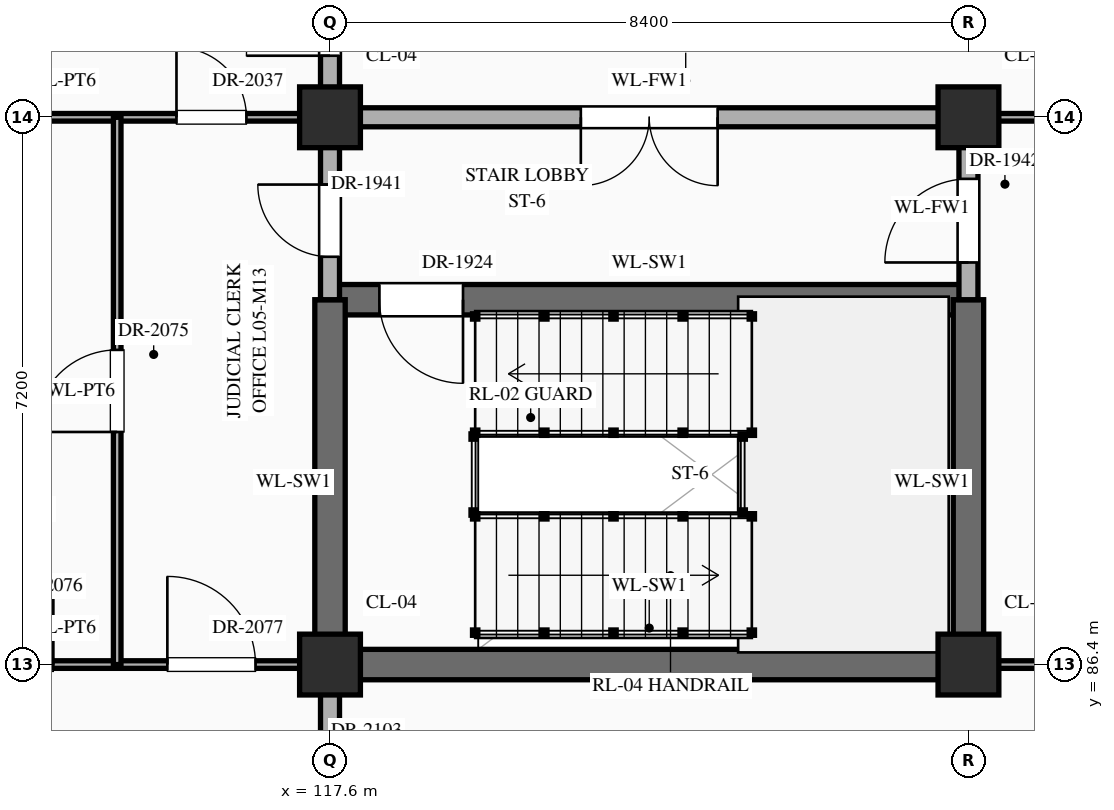
"""IFC4 building model, lengths in metres.
Left out: names, types, materials, properties, quantities, classifications, styles, units other than length and angle.
Written with IfcOpenShell. Run it as: python <this file> out.ifc"""

import sys

from ifc_helpers import new_model, si_unit, direction, frame, frame_2d, origin, origin_2d, place, context, subcontext, project, spatial, rectangle, extrude, element, fill, save


model = new_model("IFC4")
c1 = context("Model", 3, precision=1e-05, world=origin(), true_north=direction((0.0, 1.0)))
c2 = subcontext(c1, "Body", "Model", "MODEL_VIEW")
j1 = project(units=[si_unit("LENGTHUNIT", "METRE"), si_unit("PLANEANGLEUNIT", "RADIAN")], contexts=[c1])
p1 = place(None, origin())
s1 = spatial("IfcSite", under=j1, at=p1, CompositionType="ELEMENT")
p2 = place(p1, origin())
s2 = spatial("IfcBuilding", under=s1, at=p2, CompositionType="ELEMENT")
p3 = place(p2, frame((0.0, 0.0, 21.6)))
s3 = spatial("IfcBuildingStorey", under=s2, at=p3, CompositionType="ELEMENT", Elevation=21.6)
for number, where, z_axis, x_axis in (
    (1, (117.6, 86.4, 0.0), (0.0, 0.0, 1.0), (1.0, 0.0, 0.0)),
    (2, (117.6, 93.6, 0.0), (0.0, 0.0, 1.0), (1.0, 0.0, 0.0)),
    (3, (126.0, 86.4, 0.0), (0.0, 0.0, 1.0), (1.0, 0.0, 0.0)),
    (4, (126.0, 93.6, 0.0), (0.0, 0.0, 1.0), (1.0, 0.0, 0.0)),
):
    element("IfcColumn", number, at=place(p3, frame(where, z_axis=z_axis, x_axis=x_axis)), inside=s3, PredefinedType="COLUMN", context=c2, shape_type="SweptSolid", body=[
        extrude(rectangle(XDim=0.8, YDim=0.8, at=origin_2d()), origin(), (0.0, 0.0, 1.0), 4.5),
    ])
p4 = place(p3, frame((109.2, 86.4, 0.0), z_axis=(0.0, 0.0, 1.0), x_axis=(1.0, 0.0, 0.0)))
e5 = element("IfcWall", 5, at=p4, inside=s3, PredefinedType="STANDARD", context=c2, shape_type="SweptSolid", body=[
    extrude(rectangle(XDim=8.4, YDim=0.1, at=frame_2d((4.2, 0.0))), origin(), (0.0, 0.0, 1.0), 3.39),
])
p5 = place(p4, frame((1.04, 0.0, 0.0)))
e6 = element("IfcOpeningElement", 6, at=p5, cuts=e5, PredefinedType="OPENING", context=c2, shape_type="SweptSolid", body=[
    extrude(rectangle(XDim=1.04, YDim=2.2, at=frame_2d((0.52, 1.1))), frame((0.0, 0.062, 0.0), z_axis=(0.0, -1.0, 0.0), x_axis=(1.0, 0.0, 0.0)), (0.0, 0.0, 1.0), 0.124),
])
p6 = place(p4, frame((3.64, 0.0, 0.0)))
e7 = element("IfcOpeningElement", 7, at=p6, cuts=e5, PredefinedType="OPENING", context=c2, shape_type="SweptSolid", body=[
    extrude(rectangle(XDim=1.12, YDim=2.25, at=frame_2d((0.56, 1.125))), frame((0.0, 0.062, 0.0), z_axis=(0.0, -1.0, 0.0), x_axis=(1.0, 0.0, 0.0)), (0.0, 0.0, 1.0), 0.124),
])
p7 = place(p4, frame((6.26, 0.0, 0.0)))
e8 = element("IfcOpeningElement", 8, at=p7, cuts=e5, PredefinedType="OPENING", context=c2, shape_type="SweptSolid", body=[
    extrude(rectangle(XDim=1.16, YDim=2.3, at=frame_2d((0.58, 1.15))), frame((0.0, 0.062, 0.0), z_axis=(0.0, -1.0, 0.0), x_axis=(1.0, 0.0, 0.0)), (0.0, 0.0, 1.0), 0.124),
])
p8 = place(p3, frame((117.6, 86.4, 0.0), z_axis=(0.0, 0.0, 1.0), x_axis=(1.0, 0.0, 0.0)))
e9 = element("IfcWall", 9, at=p8, inside=s3, PredefinedType="SHEAR", context=c2, shape_type="SweptSolid", body=[
    extrude(rectangle(XDim=8.4, YDim=0.4, at=frame_2d((4.2, 0.0))), origin(), (0.0, 0.0, 1.0), 4.24),
])
p9 = place(p3, frame((126.0, 86.4, 0.0), z_axis=(0.0, 0.0, 1.0), x_axis=(1.0, 0.0, 0.0)))
e10 = element("IfcWall", 10, at=p9, inside=s3, PredefinedType="STANDARD", context=c2, shape_type="SweptSolid", body=[
    extrude(rectangle(XDim=16.76, YDim=0.1, at=frame_2d((8.38, 0.0))), origin(), (0.0, 0.0, 1.0), 3.19),
])
p10 = place(p9, frame((3.76, 0.0, 0.0)))
e11 = element("IfcOpeningElement", 11, at=p10, cuts=e10, PredefinedType="OPENING", context=c2, shape_type="SweptSolid", body=[
    extrude(rectangle(XDim=1.2, YDim=2.35, at=frame_2d((0.6, 1.175))), frame((0.0, 0.062, 0.0), z_axis=(0.0, -1.0, 0.0), x_axis=(1.0, 0.0, 0.0)), (0.0, 0.0, 1.0), 0.124),
])
p11 = place(p9, frame((9.16, 0.0, 0.0)))
e12 = element("IfcOpeningElement", 12, at=p11, cuts=e10, PredefinedType="OPENING", context=c2, shape_type="SweptSolid", body=[
    extrude(rectangle(XDim=1.28, YDim=2.35, at=frame_2d((0.64, 1.175))), frame((0.0, 0.062, 0.0), z_axis=(0.0, -1.0, 0.0), x_axis=(1.0, 0.0, 0.0)), (0.0, 0.0, 1.0), 0.124),
])
p12 = place(p9, frame((11.65, 0.0, 0.0)))
e13 = element("IfcOpeningElement", 13, at=p12, cuts=e10, PredefinedType="OPENING", context=c2, shape_type="SweptSolid", body=[
    extrude(rectangle(XDim=1.9, YDim=2.5, at=frame_2d((0.95, 1.25))), frame((0.0, 0.062, 0.0), z_axis=(0.0, -1.0, 0.0), x_axis=(1.0, 0.0, 0.0)), (0.0, 0.0, 1.0), 0.124),
])
p13 = place(p9, frame((14.73, 0.0, 0.0)))
e14 = element("IfcOpeningElement", 14, at=p13, cuts=e10, PredefinedType="OPENING", context=c2, shape_type="SweptSolid", body=[
    extrude(rectangle(XDim=1.02, YDim=2.4, at=frame_2d((0.51, 1.2))), frame((0.0, 0.062, 0.0), z_axis=(0.0, -1.0, 0.0), x_axis=(1.0, 0.0, 0.0)), (0.0, 0.0, 1.0), 0.124),
])
p14 = place(p3, frame((117.6, 91.2, 0.0), z_axis=(0.0, 0.0, 1.0), x_axis=(1.0, 0.0, 0.0)))
e15 = element("IfcWall", 15, at=p14, inside=s3, PredefinedType="SHEAR", context=c2, shape_type="SweptSolid", body=[
    extrude(rectangle(XDim=8.4, YDim=0.4, at=frame_2d((4.2, 0.0))), origin(), (0.0, 0.0, 1.0), 4.24),
])
p15 = place(p14, frame((0.65, 0.0, 0.0)))
e16 = element("IfcOpeningElement", 16, at=p15, cuts=e15, PredefinedType="OPENING", context=c2, shape_type="SweptSolid", body=[
    extrude(rectangle(XDim=1.1, YDim=2.2, at=frame_2d((0.55, 1.1))), frame((0.0, 0.212, 0.0), z_axis=(0.0, -1.0, 0.0), x_axis=(1.0, 0.0, 0.0)), (0.0, 0.0, 1.0), 0.424),
])
p16 = place(p3, frame((109.2, 93.6, 0.0), z_axis=(0.0, 0.0, 1.0), x_axis=(1.0, 0.0, 0.0)))
e17 = element("IfcWall", 17, at=p16, inside=s3, PredefinedType="STANDARD", context=c2, shape_type="SweptSolid", body=[
    extrude(rectangle(XDim=8.4, YDim=0.1, at=frame_2d((4.2, 0.0))), origin(), (0.0, 0.0, 1.0), 3.39),
])
p17 = place(p16, frame((1.11, 0.0, 0.0)))
e18 = element("IfcOpeningElement", 18, at=p17, cuts=e17, PredefinedType="OPENING", context=c2, shape_type="SweptSolid", body=[
    extrude(rectangle(XDim=0.9, YDim=2.15, at=frame_2d((0.45, 1.075))), frame((0.0, 0.062, 0.0), z_axis=(0.0, -1.0, 0.0), x_axis=(1.0, 0.0, 0.0)), (0.0, 0.0, 1.0), 0.124),
])
p18 = place(p16, frame((3.77, 0.0, 0.0)))
e19 = element("IfcOpeningElement", 19, at=p18, cuts=e17, PredefinedType="OPENING", context=c2, shape_type="SweptSolid", body=[
    extrude(rectangle(XDim=0.86, YDim=2.1, at=frame_2d((0.43, 1.05))), frame((0.0, 0.062, 0.0), z_axis=(0.0, -1.0, 0.0), x_axis=(1.0, 0.0, 0.0)), (0.0, 0.0, 1.0), 0.124),
])
p19 = place(p16, frame((6.38, 0.0, 0.0)))
e20 = element("IfcOpeningElement", 20, at=p19, cuts=e17, PredefinedType="OPENING", context=c2, shape_type="SweptSolid", body=[
    extrude(rectangle(XDim=0.92, YDim=2.15, at=frame_2d((0.46, 1.075))), frame((0.0, 0.062, 0.0), z_axis=(0.0, -1.0, 0.0), x_axis=(1.0, 0.0, 0.0)), (0.0, 0.0, 1.0), 0.124),
])
p20 = place(p3, frame((117.6, 93.6, 0.0), z_axis=(0.0, 0.0, 1.0), x_axis=(1.0, 0.0, 0.0)))
e21 = element("IfcWall", 21, at=p20, inside=s3, PredefinedType="STANDARD", context=c2, shape_type="SweptSolid", body=[
    extrude(rectangle(XDim=8.4, YDim=0.25, at=frame_2d((4.2, 0.0))), origin(), (0.0, 0.0, 1.0), 3.39),
])
p21 = place(p20, frame((3.3, 0.0, 0.0)))
e22 = element("IfcOpeningElement", 22, at=p21, cuts=e21, PredefinedType="OPENING", context=c2, shape_type="SweptSolid", body=[
    extrude(rectangle(XDim=1.8, YDim=2.35, at=frame_2d((0.9, 1.175))), frame((0.0, 0.137, 0.0), z_axis=(0.0, -1.0, 0.0), x_axis=(1.0, 0.0, 0.0)), (0.0, 0.0, 1.0), 0.274),
])
p22 = place(p3, frame((126.0, 93.6, 0.0), z_axis=(0.0, 0.0, 1.0), x_axis=(1.0, 0.0, 0.0)))
e23 = element("IfcWall", 23, at=p22, inside=s3, PredefinedType="STANDARD", context=c2, shape_type="SweptSolid", body=[
    extrude(rectangle(XDim=16.76, YDim=0.1, at=frame_2d((8.38, 0.0))), origin(), (0.0, 0.0, 1.0), 3.19),
])
p23 = place(p22, frame((3.78, 0.0, 0.0)))
e24 = element("IfcOpeningElement", 24, at=p23, cuts=e23, PredefinedType="OPENING", context=c2, shape_type="SweptSolid", body=[
    extrude(rectangle(XDim=1.16, YDim=2.3, at=frame_2d((0.58, 1.15))), frame((0.0, 0.062, 0.0), z_axis=(0.0, -1.0, 0.0), x_axis=(1.0, 0.0, 0.0)), (0.0, 0.0, 1.0), 0.124),
])
p24 = place(p22, frame((9.2, 0.0, 0.0)))
e25 = element("IfcOpeningElement", 25, at=p24, cuts=e23, PredefinedType="OPENING", context=c2, shape_type="SweptSolid", body=[
    extrude(rectangle(XDim=1.2, YDim=2.35, at=frame_2d((0.6, 1.175))), frame((0.0, 0.062, 0.0), z_axis=(0.0, -1.0, 0.0), x_axis=(1.0, 0.0, 0.0)), (0.0, 0.0, 1.0), 0.124),
])
p25 = place(p22, frame((11.875, 0.0, 0.0)))
e26 = element("IfcOpeningElement", 26, at=p25, cuts=e23, PredefinedType="OPENING", context=c2, shape_type="SweptSolid", body=[
    extrude(rectangle(XDim=1.45, YDim=2.3, at=frame_2d((0.725, 1.15))), frame((0.0, 0.062, 0.0), z_axis=(0.0, -1.0, 0.0), x_axis=(1.0, 0.0, 0.0)), (0.0, 0.0, 1.0), 0.124),
])
p26 = place(p22, frame((14.6, 0.0, 0.0)))
e27 = element("IfcOpeningElement", 27, at=p26, cuts=e23, PredefinedType="OPENING", context=c2, shape_type="SweptSolid", body=[
    extrude(rectangle(XDim=1.28, YDim=2.35, at=frame_2d((0.64, 1.175))), frame((0.0, 0.062, 0.0), z_axis=(0.0, -1.0, 0.0), x_axis=(1.0, 0.0, 0.0)), (0.0, 0.0, 1.0), 0.124),
])
p27 = place(p3, frame((114.8, 86.4, 0.0), z_axis=(0.0, 0.0, 1.0), x_axis=(0.0, 1.0, 0.0)))
e28 = element("IfcWall", 28, at=p27, inside=s3, PredefinedType="STANDARD", context=c2, shape_type="SweptSolid", body=[
    extrude(rectangle(XDim=7.2, YDim=0.1, at=frame_2d((3.6, 0.0))), origin(), (0.0, 0.0, 1.0), 4.24),
])
p28 = place(p27, frame((3.06, 0.0, 0.0)))
e29 = element("IfcOpeningElement", 29, at=p28, cuts=e28, PredefinedType="OPENING", context=c2, shape_type="SweptSolid", body=[
    extrude(rectangle(XDim=1.08, YDim=2.25, at=frame_2d((0.54, 1.125))), frame((0.0, 0.062, 0.0), z_axis=(0.0, -1.0, 0.0), x_axis=(1.0, 0.0, 0.0)), (0.0, 0.0, 1.0), 0.124),
])
p29 = place(p3, frame((117.6, 79.24, 0.0), z_axis=(0.0, 0.0, 1.0), x_axis=(0.0, 1.0, 0.0)))
e30 = element("IfcWall", 30, at=p29, inside=s3, PredefinedType="STANDARD", context=c2, shape_type="SweptSolid", body=[
    extrude(rectangle(XDim=7.16, YDim=0.25, at=frame_2d((3.58, 0.0))), origin(), (0.0, 0.0, 1.0), 3.49),
])
p30 = place(p29, frame((5.325, 0.0, 0.0)))
e31 = element("IfcOpeningElement", 31, at=p30, cuts=e30, PredefinedType="OPENING", context=c2, shape_type="SweptSolid", body=[
    extrude(rectangle(XDim=0.95, YDim=2.15, at=frame_2d((0.475, 1.075))), frame((0.0, 0.137, 0.0), z_axis=(0.0, -1.0, 0.0), x_axis=(1.0, 0.0, 0.0)), (0.0, 0.0, 1.0), 0.274),
])
p31 = place(p3, frame((117.6, 86.4, 0.0), z_axis=(0.0, 0.0, 1.0), x_axis=(0.0, 1.0, 0.0)))
e32 = element("IfcWall", 32, at=p31, inside=s3, PredefinedType="SHEAR", context=c2, shape_type="SweptSolid", body=[
    extrude(rectangle(XDim=4.8, YDim=0.4, at=frame_2d((2.4, 0.0))), origin(), (0.0, 0.0, 1.0), 4.24),
])
p32 = place(p3, frame((117.6, 91.2, 0.0), z_axis=(0.0, 0.0, 1.0), x_axis=(0.0, 1.0, 0.0)))
e33 = element("IfcWall", 33, at=p32, inside=s3, PredefinedType="STANDARD", context=c2, shape_type="SweptSolid", body=[
    extrude(rectangle(XDim=13.2, YDim=0.25, at=frame_2d((6.6, 0.0))), origin(), (0.0, 0.0, 1.0), 3.49),
])
p33 = place(p32, frame((0.565, 0.0, 0.0)))
e34 = element("IfcOpeningElement", 34, at=p33, cuts=e33, PredefinedType="OPENING", context=c2, shape_type="SweptSolid", body=[
    extrude(rectangle(XDim=0.95, YDim=2.15, at=frame_2d((0.475, 1.075))), frame((0.0, 0.137, 0.0), z_axis=(0.0, -1.0, 0.0), x_axis=(1.0, 0.0, 0.0)), (0.0, 0.0, 1.0), 0.274),
])
p34 = place(p32, frame((10.41, 0.0, 0.0)))
e35 = element("IfcOpeningElement", 35, at=p34, cuts=e33, PredefinedType="OPENING", context=c2, shape_type="SweptSolid", body=[
    extrude(rectangle(XDim=1.1, YDim=2.2, at=frame_2d((0.55, 1.1))), frame((0.0, 0.137, 0.0), z_axis=(0.0, -1.0, 0.0), x_axis=(1.0, 0.0, 0.0)), (0.0, 0.0, 1.0), 0.274),
])
p35 = place(p32, frame((3.21, 0.0, 0.0)))
e36 = element("IfcOpeningElement", 36, at=p35, cuts=e33, PredefinedType="OPENING", context=c2, shape_type="SweptSolid", body=[
    extrude(rectangle(XDim=1.1, YDim=2.2, at=frame_2d((0.55, 1.1))), frame((0.0, 0.137, 0.0), z_axis=(0.0, -1.0, 0.0), x_axis=(1.0, 0.0, 0.0)), (0.0, 0.0, 1.0), 0.274),
])
p36 = place(p3, frame((126.0, 86.4, 0.0), z_axis=(0.0, 0.0, 1.0), x_axis=(0.0, 1.0, 0.0)))
e37 = element("IfcWall", 37, at=p36, inside=s3, PredefinedType="SHEAR", context=c2, shape_type="SweptSolid", body=[
    extrude(rectangle(XDim=4.8, YDim=0.4, at=frame_2d((2.4, 0.0))), origin(), (0.0, 0.0, 1.0), 4.24),
])
p37 = place(p3, frame((126.0, 91.2, 0.0), z_axis=(0.0, 0.0, 1.0), x_axis=(0.0, 1.0, 0.0)))
e38 = element("IfcWall", 38, at=p37, inside=s3, PredefinedType="STANDARD", context=c2, shape_type="SweptSolid", body=[
    extrude(rectangle(XDim=2.4, YDim=0.25, at=frame_2d((1.2, 0.0))), origin(), (0.0, 0.0, 1.0), 3.49),
])
p38 = place(p37, frame((0.49, 0.0, 0.0)))
e39 = element("IfcOpeningElement", 39, at=p38, cuts=e38, PredefinedType="OPENING", context=c2, shape_type="SweptSolid", body=[
    extrude(rectangle(XDim=1.1, YDim=2.2, at=frame_2d((0.55, 1.1))), frame((0.0, 0.137, 0.0), z_axis=(0.0, -1.0, 0.0), x_axis=(1.0, 0.0, 0.0)), (0.0, 0.0, 1.0), 0.274),
])
p39 = place(p15, frame((1.1, 0.0, 0.0), z_axis=(0.0, 0.0, 1.0), x_axis=(-1.0, 0.0, 0.0)))
e40 = element("IfcDoor", 40, at=p39, inside=s3, OperationType="SINGLE_SWING_LEFT", PredefinedType="DOOR", context=c2, shape_type="SweptSolid", body=[
    extrude(rectangle(XDim=1.1, YDim=2.2, at=frame_2d((0.55, 1.1))), frame((0.0, 0.025, 0.0), z_axis=(0.0, -1.0, 0.0), x_axis=(1.0, 0.0, 0.0)), (0.0, 0.0, 1.0), 0.05),
])
fill(e16, e40)
p40 = place(p21, frame((1.8, 0.0, 0.0), z_axis=(0.0, 0.0, 1.0), x_axis=(-1.0, 0.0, 0.0)))
e41 = element("IfcDoor", 41, at=p40, inside=s3, OperationType="DOUBLE_DOOR_SINGLE_SWING", PredefinedType="DOOR", context=c2, shape_type="SweptSolid", body=[
    extrude(rectangle(XDim=1.8, YDim=2.35, at=frame_2d((0.9, 1.175))), frame((0.0, 0.025, 0.0), z_axis=(0.0, -1.0, 0.0), x_axis=(1.0, 0.0, 0.0)), (0.0, 0.0, 1.0), 0.05),
])
fill(e22, e41)
p41 = place(p33, origin())
e42 = element("IfcDoor", 42, at=p41, inside=s3, OperationType="SINGLE_SWING_RIGHT", PredefinedType="DOOR", context=c2, shape_type="SweptSolid", body=[
    extrude(rectangle(XDim=0.95, YDim=2.15, at=frame_2d((0.475, 1.075))), frame((0.0, 0.025, 0.0), z_axis=(0.0, -1.0, 0.0), x_axis=(1.0, 0.0, 0.0)), (0.0, 0.0, 1.0), 0.05),
])
fill(e34, e42)
p42 = place(p38, origin())
e43 = element("IfcDoor", 43, at=p42, inside=s3, OperationType="SINGLE_SWING_LEFT", PredefinedType="DOOR", context=c2, shape_type="SweptSolid", body=[
    extrude(rectangle(XDim=1.1, YDim=2.2, at=frame_2d((0.55, 1.1))), frame((0.0, 0.025, 0.0), z_axis=(0.0, -1.0, 0.0), x_axis=(1.0, 0.0, 0.0)), (0.0, 0.0, 1.0), 0.05),
])
fill(e39, e43)
p43 = place(p35, origin())
e44 = element("IfcDoor", 44, at=p43, inside=s3, OperationType="SINGLE_SWING_LEFT", PredefinedType="DOOR", context=c2, shape_type="SweptSolid", body=[
    extrude(rectangle(XDim=1.1, YDim=2.2, at=frame_2d((0.55, 1.1))), frame((0.0, 0.025, 0.0), z_axis=(0.0, -1.0, 0.0), x_axis=(1.0, 0.0, 0.0)), (0.0, 0.0, 1.0), 0.05),
])
fill(e36, e44)
p44 = place(p19, origin())
e45 = element("IfcDoor", 45, at=p44, inside=s3, OperationType="SINGLE_SWING_LEFT", PredefinedType="DOOR", context=c2, shape_type="SweptSolid", body=[
    extrude(rectangle(XDim=0.92, YDim=2.15, at=frame_2d((0.46, 1.075))), frame((0.0, 0.025, 0.0), z_axis=(0.0, -1.0, 0.0), x_axis=(1.0, 0.0, 0.0)), (0.0, 0.0, 1.0), 0.05),
])
fill(e20, e45)
p45 = place(p28, origin())
e46 = element("IfcDoor", 46, at=p45, inside=s3, OperationType="SINGLE_SWING_LEFT", PredefinedType="DOOR", context=c2, shape_type="SweptSolid", body=[
    extrude(rectangle(XDim=1.08, YDim=2.25, at=frame_2d((0.54, 1.125))), frame((0.0, 0.025, 0.0), z_axis=(0.0, -1.0, 0.0), x_axis=(1.0, 0.0, 0.0)), (0.0, 0.0, 1.0), 0.05),
])
fill(e29, e46)
p46 = place(p6, origin())
e47 = element("IfcDoor", 47, at=p46, inside=s3, OperationType="SINGLE_SWING_RIGHT", PredefinedType="DOOR", context=c2, shape_type="SweptSolid", body=[
    extrude(rectangle(XDim=1.12, YDim=2.25, at=frame_2d((0.56, 1.125))), frame((0.0, 0.025, 0.0), z_axis=(0.0, -1.0, 0.0), x_axis=(1.0, 0.0, 0.0)), (0.0, 0.0, 1.0), 0.05),
])
fill(e7, e47)
p47 = place(p7, origin())
e48 = element("IfcDoor", 48, at=p47, inside=s3, OperationType="SINGLE_SWING_LEFT", PredefinedType="DOOR", context=c2, shape_type="SweptSolid", body=[
    extrude(rectangle(XDim=1.16, YDim=2.3, at=frame_2d((0.58, 1.15))), frame((0.0, 0.025, 0.0), z_axis=(0.0, -1.0, 0.0), x_axis=(1.0, 0.0, 0.0)), (0.0, 0.0, 1.0), 0.05),
])
fill(e8, e48)
save(model, sys.argv[1])
